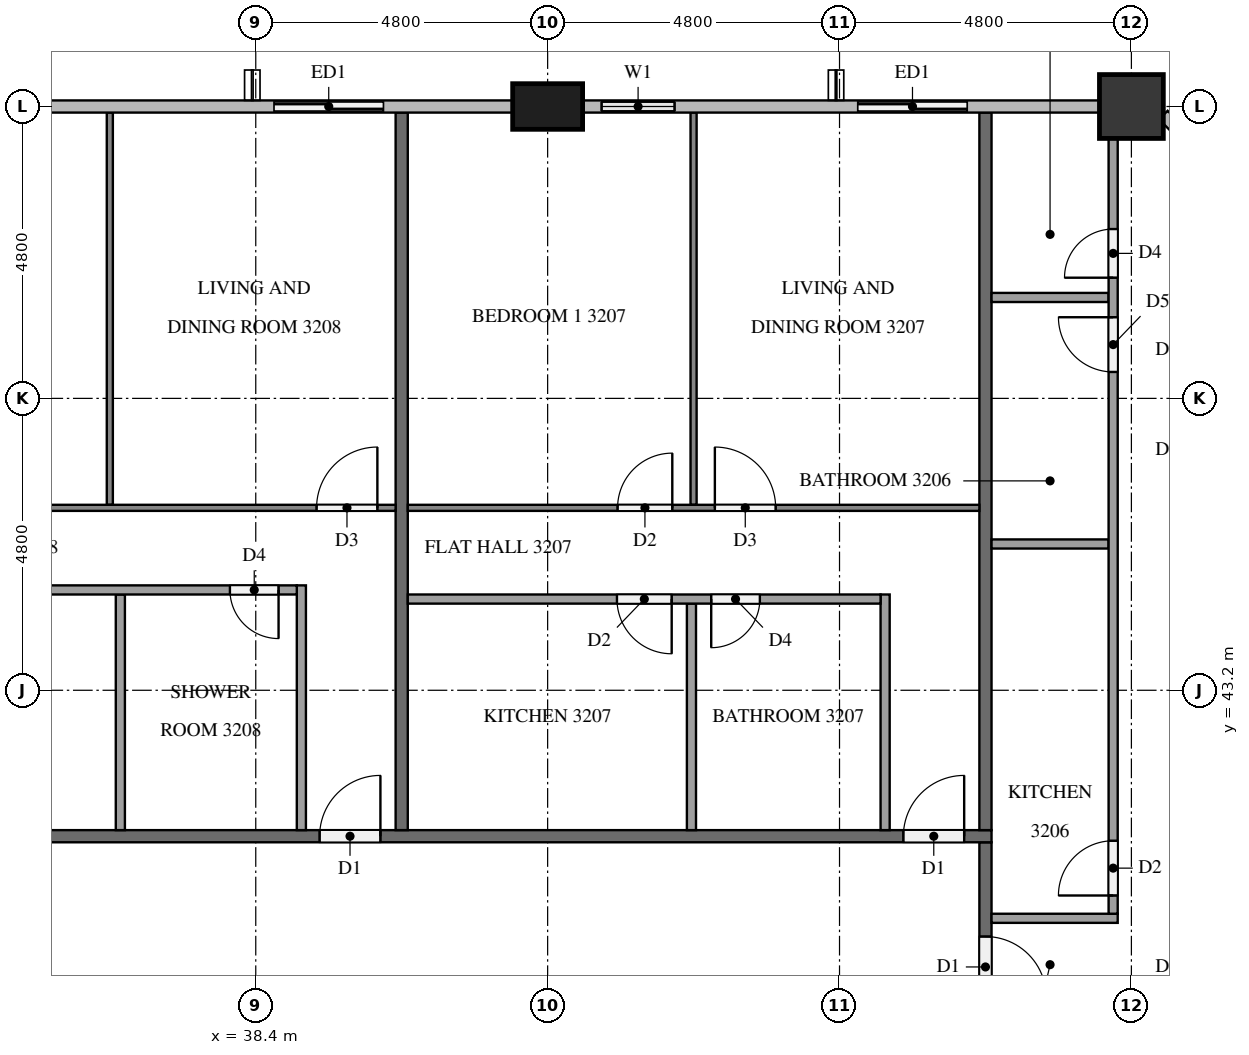
"""IFC4 building model, lengths in metres.
Left out: names, types, materials, properties, quantities, classifications, styles, units other than length and angle.
Written with IfcOpenShell. Run it as: python <this file> out.ifc"""

import sys

from ifc_helpers import new_model, si_unit, direction, frame, frame_2d, origin, origin_2d, place, context, subcontext, project, spatial, rectangle, extrude, element, fill, save


model = new_model("IFC4")
c1 = context("Model", 3, precision=1e-05, world=origin(), true_north=direction((0.0, 1.0)))
c2 = subcontext(c1, "Body", "Model", "MODEL_VIEW")
j1 = project(units=[si_unit("LENGTHUNIT", "METRE"), si_unit("PLANEANGLEUNIT", "RADIAN")], contexts=[c1])
p1 = place(None, origin())
s1 = spatial("IfcSite", under=j1, at=p1, CompositionType="ELEMENT")
p2 = place(p1, origin())
s2 = spatial("IfcBuilding", under=s1, at=p2, CompositionType="ELEMENT")
p3 = place(p2, frame((0.0, 0.0, 126.1)))
s3 = spatial("IfcBuildingStorey", under=s2, at=p3, CompositionType="ELEMENT", Elevation=126.1)
p4 = place(p3, frame((52.8, 52.8, 0.0), z_axis=(0.0, 0.0, 1.0), x_axis=(1.0, 0.0, 0.0)))
e1 = element("IfcColumn", 1, at=p4, inside=s3, PredefinedType="COLUMN", context=c2, shape_type="SweptSolid", body=[
    extrude(rectangle(XDim=1.05, YDim=1.05, at=origin_2d()), origin(), (0.0, 0.0, 1.0), 3.2),
])
p5 = place(p3, frame((43.2, 52.8, 0.0), z_axis=(0.0, 0.0, 1.0), x_axis=(1.0, 0.0, 0.0)))
e2 = element("IfcColumn", 2, at=p5, inside=s3, PredefinedType="COLUMN", context=c2, shape_type="SweptSolid", body=[
    extrude(rectangle(XDim=1.15, YDim=0.75, at=origin_2d()), origin(), (0.0, 0.0, 1.0), 3.2),
])
p6 = place(p3, frame((50.4, 52.8, 0.0), z_axis=(0.0, 0.0, 1.0), x_axis=(-1.0, 0.0, 0.0)))
e3 = element("IfcWall", 3, at=p6, inside=s3, PredefinedType="SOLIDWALL", context=c2, shape_type="SweptSolid", body=[
    extrude(rectangle(XDim=2.4, YDim=0.15, at=frame_2d((1.2, 0.0))), origin(), (0.0, 0.0, 1.0), 3.2),
])
p7 = place(p6, frame((0.3, 0.0, 0.0)))
e4 = element("IfcOpeningElement", 4, at=p7, cuts=e3, PredefinedType="OPENING", context=c2, shape_type="SweptSolid", body=[
    extrude(rectangle(XDim=1.8, YDim=2.4, at=frame_2d((0.9, 1.2))), frame((0.0, 0.085, 0.0), z_axis=(0.0, -1.0, 0.0), x_axis=(1.0, 0.0, 0.0)), (0.0, 0.0, 1.0), 0.17),
])
p8 = place(p3, frame((45.6, 52.8, 0.0), z_axis=(0.0, 0.0, 1.0), x_axis=(-1.0, 0.0, 0.0)))
e5 = element("IfcWall", 5, at=p8, inside=s3, PredefinedType="SOLIDWALL", context=c2, shape_type="SweptSolid", body=[
    extrude(rectangle(XDim=1.825, YDim=0.15, at=frame_2d((0.913, 0.0))), origin(), (0.0, 0.0, 1.0), 3.2),
])
p9 = place(p8, frame((0.312, 0.0, 0.9)))
e6 = element("IfcOpeningElement", 6, at=p9, cuts=e5, PredefinedType="OPENING", context=c2, shape_type="SweptSolid", body=[
    extrude(rectangle(XDim=1.2, YDim=1.4, at=frame_2d((0.6, 0.7))), frame((0.0, 0.085, 0.0), z_axis=(0.0, -1.0, 0.0), x_axis=(1.0, 0.0, 0.0)), (0.0, 0.0, 1.0), 0.17),
])
p10 = place(p3, frame((40.8, 52.8, 0.0), z_axis=(0.0, 0.0, 1.0), x_axis=(-1.0, 0.0, 0.0)))
e7 = element("IfcWall", 7, at=p10, inside=s3, PredefinedType="SOLIDWALL", context=c2, shape_type="SweptSolid", body=[
    extrude(rectangle(XDim=2.4, YDim=0.15, at=frame_2d((1.2, 0.0))), origin(), (0.0, 0.0, 1.0), 3.2),
])
p11 = place(p10, frame((0.3, 0.0, 0.0)))
e8 = element("IfcOpeningElement", 8, at=p11, cuts=e7, PredefinedType="OPENING", context=c2, shape_type="SweptSolid", body=[
    extrude(rectangle(XDim=1.8, YDim=2.4, at=frame_2d((0.9, 1.2))), frame((0.0, 0.085, 0.0), z_axis=(0.0, -1.0, 0.0), x_axis=(1.0, 0.0, 0.0)), (0.0, 0.0, 1.0), 0.17),
])
p12 = place(p3, frame((50.4, 40.7, 0.0), z_axis=(0.0, 0.0, 1.0), x_axis=(0.0, -1.0, 0.0)))
e9 = element("IfcWall", 9, at=p12, inside=s3, PredefinedType="PARTITIONING", context=c2, shape_type="SweptSolid", body=[
    extrude(rectangle(XDim=2.8, YDim=0.2, at=frame_2d((1.4, 0.0))), origin(), (0.0, 0.0, 1.0), 3.2),
])
p13 = place(p12, frame((1.55, 0.0, 0.0)))
e10 = element("IfcOpeningElement", 10, at=p13, cuts=e9, PredefinedType="OPENING", context=c2, shape_type="SweptSolid", body=[
    extrude(rectangle(XDim=1.0, YDim=2.1, at=frame_2d((0.5, 1.05))), frame((0.0, 0.11, 0.0), z_axis=(0.0, -1.0, 0.0), x_axis=(1.0, 0.0, 0.0)), (0.0, 0.0, 1.0), 0.22),
])
p14 = place(p3, frame((11.9, 40.8, 0.0), z_axis=(0.0, 0.0, 1.0), x_axis=(1.0, 0.0, 0.0)))
e11 = element("IfcWall", 11, at=p14, inside=s3, PredefinedType="PARTITIONING", context=c2, shape_type="SweptSolid", body=[
    extrude(rectangle(XDim=38.6, YDim=0.2, at=frame_2d((19.3, 0.0))), origin(), (0.0, 0.0, 1.0), 3.2),
])
p15 = place(p14, frame((37.15, 0.0, 0.0)))
e12 = element("IfcOpeningElement", 12, at=p15, cuts=e11, PredefinedType="OPENING", context=c2, shape_type="SweptSolid", body=[
    extrude(rectangle(XDim=1.0, YDim=2.1, at=frame_2d((0.5, 1.05))), frame((0.0, 0.11, 0.0), z_axis=(0.0, -1.0, 0.0), x_axis=(1.0, 0.0, 0.0)), (0.0, 0.0, 1.0), 0.22),
])
p16 = place(p14, frame((27.55, 0.0, 0.0)))
e13 = element("IfcOpeningElement", 13, at=p16, cuts=e11, PredefinedType="OPENING", context=c2, shape_type="SweptSolid", body=[
    extrude(rectangle(XDim=1.0, YDim=2.1, at=frame_2d((0.5, 1.05))), frame((0.0, 0.11, 0.0), z_axis=(0.0, -1.0, 0.0), x_axis=(1.0, 0.0, 0.0)), (0.0, 0.0, 1.0), 0.22),
])
p17 = place(p14, frame((13.15, 0.0, 0.0)))
e14 = element("IfcOpeningElement", 14, at=p17, cuts=e11, PredefinedType="OPENING", context=c2, shape_type="SweptSolid", body=[
    extrude(rectangle(XDim=1.0, YDim=2.1, at=frame_2d((0.5, 1.05))), frame((0.0, 0.11, 0.0), z_axis=(0.0, -1.0, 0.0), x_axis=(1.0, 0.0, 0.0)), (0.0, 0.0, 1.0), 0.22),
])
for number, where, z_axis, x_axis in (
    (15, (50.4, 40.9, 0.0), (0.0, 0.0, 1.0), (0.0, 1.0, 0.0)),
    (16, (40.8, 52.7, 0.0), (0.0, 0.0, 1.0), (0.0, -1.0, 0.0)),
):
    element("IfcWall", number, at=place(p3, frame(where, z_axis=z_axis, x_axis=x_axis)), inside=s3, PredefinedType="PARTITIONING", context=c2, shape_type="SweptSolid", body=[
        extrude(rectangle(XDim=11.8, YDim=0.2, at=frame_2d((5.9, 0.0))), origin(), (0.0, 0.0, 1.0), 3.2),
    ])
for number, where, z_axis, x_axis in (
    (17, (50.5, 45.606, 0.0), (0.0, 0.0, 1.0), (1.0, 0.0, 0.0)),
    (18, (50.5, 49.66, 0.0), (0.0, 0.0, 1.0), (1.0, 0.0, 0.0)),
):
    element("IfcWall", number, at=place(p3, frame(where, z_axis=z_axis, x_axis=x_axis)), inside=s3, PredefinedType="PARTITIONING", context=c2, shape_type="SweptSolid", body=[
        extrude(rectangle(XDim=1.925, YDim=0.15, at=frame_2d((0.962, 0.0))), origin(), (0.0, 0.0, 1.0), 3.2),
    ])
p18 = place(p3, frame((50.5, 39.45, 0.0), z_axis=(0.0, 0.0, 1.0), x_axis=(1.0, 0.0, 0.0)))
e19 = element("IfcWall", 19, at=p18, inside=s3, PredefinedType="PARTITIONING", context=c2, shape_type="SweptSolid", body=[
    extrude(rectangle(XDim=2.075, YDim=0.15, at=frame_2d((1.038, 0.0))), origin(), (0.0, 0.0, 1.0), 3.2),
])
p19 = place(p3, frame((52.5, 39.525, 0.0), z_axis=(0.0, 0.0, 1.0), x_axis=(0.0, 1.0, 0.0)))
e20 = element("IfcWall", 20, at=p19, inside=s3, PredefinedType="PARTITIONING", context=c2, shape_type="SweptSolid", body=[
    extrude(rectangle(XDim=12.75, YDim=0.15, at=frame_2d((6.375, 0.0))), origin(), (0.0, 0.0, 1.0), 3.2),
])
p20 = place(p19, frame((0.3, 0.0, 0.0)))
e21 = element("IfcOpeningElement", 21, at=p20, cuts=e20, PredefinedType="OPENING", context=c2, shape_type="SweptSolid", body=[
    extrude(rectangle(XDim=0.9, YDim=2.1, at=frame_2d((0.45, 1.05))), frame((0.0, 0.085, 0.0), z_axis=(0.0, -1.0, 0.0), x_axis=(1.0, 0.0, 0.0)), (0.0, 0.0, 1.0), 0.17),
])
p21 = place(p19, frame((8.91, 0.0, 0.0)))
e22 = element("IfcOpeningElement", 22, at=p21, cuts=e20, PredefinedType="OPENING", context=c2, shape_type="SweptSolid", body=[
    extrude(rectangle(XDim=0.9, YDim=2.1, at=frame_2d((0.45, 1.05))), frame((0.0, 0.085, 0.0), z_axis=(0.0, -1.0, 0.0), x_axis=(1.0, 0.0, 0.0)), (0.0, 0.0, 1.0), 0.17),
])
p22 = place(p19, frame((10.46, 0.0, 0.0)))
e23 = element("IfcOpeningElement", 23, at=p22, cuts=e20, PredefinedType="OPENING", context=c2, shape_type="SweptSolid", body=[
    extrude(rectangle(XDim=0.8, YDim=2.1, at=frame_2d((0.4, 1.05))), frame((0.0, 0.085, 0.0), z_axis=(0.0, -1.0, 0.0), x_axis=(1.0, 0.0, 0.0)), (0.0, 0.0, 1.0), 0.17),
])
p23 = place(p3, frame((45.6, 46.25, 0.0), z_axis=(0.0, 0.0, 1.0), x_axis=(0.0, 1.0, 0.0)))
e24 = element("IfcWall", 24, at=p23, inside=s3, PredefinedType="PARTITIONING", context=c2, shape_type="SweptSolid", body=[
    extrude(rectangle(XDim=6.45, YDim=0.1, at=frame_2d((3.225, 0.0))), origin(), (0.0, 0.0, 1.0), 3.2),
])
p24 = place(p3, frame((40.9, 46.2, 0.0), z_axis=(0.0, 0.0, 1.0), x_axis=(1.0, 0.0, 0.0)))
e25 = element("IfcWall", 25, at=p24, inside=s3, PredefinedType="PARTITIONING", context=c2, shape_type="SweptSolid", body=[
    extrude(rectangle(XDim=9.4, YDim=0.1, at=frame_2d((4.7, 0.0))), origin(), (0.0, 0.0, 1.0), 3.2),
])
p25 = place(p24, frame((5.05, 0.0, 0.0)))
e26 = element("IfcOpeningElement", 26, at=p25, cuts=e25, PredefinedType="OPENING", context=c2, shape_type="SweptSolid", body=[
    extrude(rectangle(XDim=1.0, YDim=2.1, at=frame_2d((0.5, 1.05))), frame((0.0, 0.06, 0.0), z_axis=(0.0, -1.0, 0.0), x_axis=(1.0, 0.0, 0.0)), (0.0, 0.0, 1.0), 0.12),
])
p26 = place(p24, frame((3.45, 0.0, 0.0)))
e27 = element("IfcOpeningElement", 27, at=p26, cuts=e25, PredefinedType="OPENING", context=c2, shape_type="SweptSolid", body=[
    extrude(rectangle(XDim=0.9, YDim=2.1, at=frame_2d((0.45, 1.05))), frame((0.0, 0.06, 0.0), z_axis=(0.0, -1.0, 0.0), x_axis=(1.0, 0.0, 0.0)), (0.0, 0.0, 1.0), 0.12),
])
p27 = place(p3, frame((45.565, 40.9, 0.0), z_axis=(0.0, 0.0, 1.0), x_axis=(0.0, 1.0, 0.0)))
e28 = element("IfcWall", 28, at=p27, inside=s3, PredefinedType="PARTITIONING", context=c2, shape_type="SweptSolid", body=[
    extrude(rectangle(XDim=3.725, YDim=0.15, at=frame_2d((1.863, 0.0))), origin(), (0.0, 0.0, 1.0), 3.2),
])
p28 = place(p3, frame((48.75, 40.9, 0.0), z_axis=(0.0, 0.0, 1.0), x_axis=(0.0, 1.0, 0.0)))
e29 = element("IfcWall", 29, at=p28, inside=s3, PredefinedType="PARTITIONING", context=c2, shape_type="SweptSolid", body=[
    extrude(rectangle(XDim=3.875, YDim=0.15, at=frame_2d((1.938, 0.0))), origin(), (0.0, 0.0, 1.0), 3.2),
])
p29 = place(p3, frame((48.675, 44.7, 0.0), z_axis=(0.0, 0.0, 1.0), x_axis=(-1.0, 0.0, 0.0)))
e30 = element("IfcWall", 30, at=p29, inside=s3, PredefinedType="PARTITIONING", context=c2, shape_type="SweptSolid", body=[
    extrude(rectangle(XDim=7.775, YDim=0.15, at=frame_2d((3.888, 0.0))), origin(), (0.0, 0.0, 1.0), 3.2),
])
p30 = place(p29, frame((1.985, 0.0, 0.0)))
e31 = element("IfcOpeningElement", 31, at=p30, cuts=e30, PredefinedType="OPENING", context=c2, shape_type="SweptSolid", body=[
    extrude(rectangle(XDim=0.8, YDim=2.1, at=frame_2d((0.4, 1.05))), frame((0.0, 0.085, 0.0), z_axis=(0.0, -1.0, 0.0), x_axis=(1.0, 0.0, 0.0)), (0.0, 0.0, 1.0), 0.17),
])
p31 = place(p29, frame((3.435, 0.0, 0.0)))
e32 = element("IfcOpeningElement", 32, at=p31, cuts=e30, PredefinedType="OPENING", context=c2, shape_type="SweptSolid", body=[
    extrude(rectangle(XDim=0.9, YDim=2.1, at=frame_2d((0.45, 1.05))), frame((0.0, 0.085, 0.0), z_axis=(0.0, -1.0, 0.0), x_axis=(1.0, 0.0, 0.0)), (0.0, 0.0, 1.0), 0.17),
])
p32 = place(p3, frame((36.0, 46.25, 0.0), z_axis=(0.0, 0.0, 1.0), x_axis=(0.0, 1.0, 0.0)))
e33 = element("IfcWall", 33, at=p32, inside=s3, PredefinedType="PARTITIONING", context=c2, shape_type="SweptSolid", body=[
    extrude(rectangle(XDim=6.45, YDim=0.1, at=frame_2d((3.225, 0.0))), origin(), (0.0, 0.0, 1.0), 3.2),
])
p33 = place(p3, frame((26.5, 46.2, 0.0), z_axis=(0.0, 0.0, 1.0), x_axis=(1.0, 0.0, 0.0)))
e34 = element("IfcWall", 34, at=p33, inside=s3, PredefinedType="PARTITIONING", context=c2, shape_type="SweptSolid", body=[
    extrude(rectangle(XDim=14.2, YDim=0.1, at=frame_2d((7.1, 0.0))), origin(), (0.0, 0.0, 1.0), 3.2),
])
p34 = place(p33, frame((12.9, 0.0, 0.0)))
e35 = element("IfcOpeningElement", 35, at=p34, cuts=e34, PredefinedType="OPENING", context=c2, shape_type="SweptSolid", body=[
    extrude(rectangle(XDim=1.0, YDim=2.1, at=frame_2d((0.5, 1.05))), frame((0.0, 0.06, 0.0), z_axis=(0.0, -1.0, 0.0), x_axis=(1.0, 0.0, 0.0)), (0.0, 0.0, 1.0), 0.12),
])
p35 = place(p33, frame((5.05, 0.0, 0.0)))
e36 = element("IfcOpeningElement", 36, at=p35, cuts=e34, PredefinedType="OPENING", context=c2, shape_type="SweptSolid", body=[
    extrude(rectangle(XDim=0.9, YDim=2.1, at=frame_2d((0.45, 1.05))), frame((0.0, 0.06, 0.0), z_axis=(0.0, -1.0, 0.0), x_axis=(1.0, 0.0, 0.0)), (0.0, 0.0, 1.0), 0.12),
])
p36 = place(p33, frame((3.45, 0.0, 0.0)))
e37 = element("IfcOpeningElement", 37, at=p36, cuts=e34, PredefinedType="OPENING", context=c2, shape_type="SweptSolid", body=[
    extrude(rectangle(XDim=0.9, YDim=2.1, at=frame_2d((0.45, 1.05))), frame((0.0, 0.06, 0.0), z_axis=(0.0, -1.0, 0.0), x_axis=(1.0, 0.0, 0.0)), (0.0, 0.0, 1.0), 0.12),
])
p37 = place(p3, frame((36.173, 40.9, 0.0), z_axis=(0.0, 0.0, 1.0), x_axis=(0.0, 1.0, 0.0)))
e38 = element("IfcWall", 38, at=p37, inside=s3, PredefinedType="PARTITIONING", context=c2, shape_type="SweptSolid", body=[
    extrude(rectangle(XDim=3.875, YDim=0.15, at=frame_2d((1.938, 0.0))), origin(), (0.0, 0.0, 1.0), 3.2),
])
p38 = place(p3, frame((39.15, 40.9, 0.0), z_axis=(0.0, 0.0, 1.0), x_axis=(0.0, 1.0, 0.0)))
e39 = element("IfcWall", 39, at=p38, inside=s3, PredefinedType="PARTITIONING", context=c2, shape_type="SweptSolid", body=[
    extrude(rectangle(XDim=4.025, YDim=0.15, at=frame_2d((2.013, 0.0))), origin(), (0.0, 0.0, 1.0), 3.2),
])
p39 = place(p3, frame((39.075, 44.85, 0.0), z_axis=(0.0, 0.0, 1.0), x_axis=(-1.0, 0.0, 0.0)))
e40 = element("IfcWall", 40, at=p39, inside=s3, PredefinedType="PARTITIONING", context=c2, shape_type="SweptSolid", body=[
    extrude(rectangle(XDim=12.575, YDim=0.15, at=frame_2d((6.288, 0.0))), origin(), (0.0, 0.0, 1.0), 3.2),
])
p40 = place(p39, frame((0.3, 0.0, 0.0)))
e41 = element("IfcOpeningElement", 41, at=p40, cuts=e40, PredefinedType="OPENING", context=c2, shape_type="SweptSolid", body=[
    extrude(rectangle(XDim=0.8, YDim=2.1, at=frame_2d((0.4, 1.05))), frame((0.0, 0.085, 0.0), z_axis=(0.0, -1.0, 0.0), x_axis=(1.0, 0.0, 0.0)), (0.0, 0.0, 1.0), 0.17),
])
p41 = place(p39, frame((7.481, 0.0, 0.0)))
e42 = element("IfcOpeningElement", 42, at=p41, cuts=e40, PredefinedType="OPENING", context=c2, shape_type="SweptSolid", body=[
    extrude(rectangle(XDim=0.9, YDim=2.1, at=frame_2d((0.45, 1.05))), frame((0.0, 0.085, 0.0), z_axis=(0.0, -1.0, 0.0), x_axis=(1.0, 0.0, 0.0)), (0.0, 0.0, 1.0), 0.17),
])
p42 = place(p39, frame((9.031, 0.0, 0.0)))
e43 = element("IfcOpeningElement", 43, at=p42, cuts=e40, PredefinedType="OPENING", context=c2, shape_type="SweptSolid", body=[
    extrude(rectangle(XDim=0.9, YDim=2.1, at=frame_2d((0.45, 1.05))), frame((0.0, 0.085, 0.0), z_axis=(0.0, -1.0, 0.0), x_axis=(1.0, 0.0, 0.0)), (0.0, 0.0, 1.0), 0.17),
])
p43 = place(p7, origin())
e44 = element("IfcDoor", 44, at=p43, inside=s3, OperationType="SLIDING_TO_LEFT", PredefinedType="DOOR", context=c2, shape_type="SweptSolid", body=[
    extrude(rectangle(XDim=1.8, YDim=2.4, at=frame_2d((0.9, 1.2))), frame((0.0, 0.025, 0.0), z_axis=(0.0, -1.0, 0.0), x_axis=(1.0, 0.0, 0.0)), (0.0, 0.0, 1.0), 0.05),
])
fill(e4, e44)
p44 = place(p9, origin())
e45 = element("IfcWindow", 45, at=p44, inside=s3, PartitioningType="SINGLE_PANEL", PredefinedType="WINDOW", context=c2, shape_type="SweptSolid", body=[
    extrude(rectangle(XDim=1.2, YDim=1.4, at=frame_2d((0.6, 0.7))), frame((0.0, 0.03, 0.0), z_axis=(0.0, -1.0, 0.0), x_axis=(1.0, 0.0, 0.0)), (0.0, 0.0, 1.0), 0.06),
])
fill(e6, e45)
p45 = place(p11, origin())
e46 = element("IfcDoor", 46, at=p45, inside=s3, OperationType="SLIDING_TO_RIGHT", PredefinedType="DOOR", context=c2, shape_type="SweptSolid", body=[
    extrude(rectangle(XDim=1.8, YDim=2.4, at=frame_2d((0.9, 1.2))), frame((0.0, 0.025, 0.0), z_axis=(0.0, -1.0, 0.0), x_axis=(1.0, 0.0, 0.0)), (0.0, 0.0, 1.0), 0.05),
])
fill(e8, e46)
p46 = place(p13, origin())
e47 = element("IfcDoor", 47, at=p46, inside=s3, OperationType="SINGLE_SWING_RIGHT", PredefinedType="DOOR", context=c2, shape_type="SweptSolid", body=[
    extrude(rectangle(XDim=1.0, YDim=2.1, at=frame_2d((0.5, 1.05))), frame((0.0, 0.025, 0.0), z_axis=(0.0, -1.0, 0.0), x_axis=(1.0, 0.0, 0.0)), (0.0, 0.0, 1.0), 0.05),
])
fill(e10, e47)
p47 = place(p15, origin())
e48 = element("IfcDoor", 48, at=p47, inside=s3, OperationType="SINGLE_SWING_RIGHT", PredefinedType="DOOR", context=c2, shape_type="SweptSolid", body=[
    extrude(rectangle(XDim=1.0, YDim=2.1, at=frame_2d((0.5, 1.05))), frame((0.0, 0.025, 0.0), z_axis=(0.0, -1.0, 0.0), x_axis=(1.0, 0.0, 0.0)), (0.0, 0.0, 1.0), 0.05),
])
fill(e12, e48)
p48 = place(p16, origin())
e49 = element("IfcDoor", 49, at=p48, inside=s3, OperationType="SINGLE_SWING_RIGHT", PredefinedType="DOOR", context=c2, shape_type="SweptSolid", body=[
    extrude(rectangle(XDim=1.0, YDim=2.1, at=frame_2d((0.5, 1.05))), frame((0.0, 0.025, 0.0), z_axis=(0.0, -1.0, 0.0), x_axis=(1.0, 0.0, 0.0)), (0.0, 0.0, 1.0), 0.05),
])
fill(e13, e49)
p49 = place(p20, origin())
e50 = element("IfcDoor", 50, at=p49, inside=s3, OperationType="SINGLE_SWING_LEFT", PredefinedType="DOOR", context=c2, shape_type="SweptSolid", body=[
    extrude(rectangle(XDim=0.9, YDim=2.1, at=frame_2d((0.45, 1.05))), frame((0.0, 0.025, 0.0), z_axis=(0.0, -1.0, 0.0), x_axis=(1.0, 0.0, 0.0)), (0.0, 0.0, 1.0), 0.05),
])
fill(e21, e50)
p50 = place(p21, origin())
e51 = element("IfcDoor", 51, at=p50, inside=s3, OperationType="SINGLE_SWING_RIGHT", PredefinedType="DOOR", context=c2, shape_type="SweptSolid", body=[
    extrude(rectangle(XDim=0.9, YDim=2.1, at=frame_2d((0.45, 1.05))), frame((0.0, 0.025, 0.0), z_axis=(0.0, -1.0, 0.0), x_axis=(1.0, 0.0, 0.0)), (0.0, 0.0, 1.0), 0.05),
])
fill(e22, e51)
p51 = place(p22, origin())
e52 = element("IfcDoor", 52, at=p51, inside=s3, OperationType="SINGLE_SWING_LEFT", PredefinedType="DOOR", context=c2, shape_type="SweptSolid", body=[
    extrude(rectangle(XDim=0.8, YDim=2.1, at=frame_2d((0.4, 1.05))), frame((0.0, 0.025, 0.0), z_axis=(0.0, -1.0, 0.0), x_axis=(1.0, 0.0, 0.0)), (0.0, 0.0, 1.0), 0.05),
])
fill(e23, e52)
p52 = place(p25, origin())
e53 = element("IfcDoor", 53, at=p52, inside=s3, OperationType="SINGLE_SWING_LEFT", PredefinedType="DOOR", context=c2, shape_type="SweptSolid", body=[
    extrude(rectangle(XDim=1.0, YDim=2.1, at=frame_2d((0.5, 1.05))), frame((0.0, 0.025, 0.0), z_axis=(0.0, -1.0, 0.0), x_axis=(1.0, 0.0, 0.0)), (0.0, 0.0, 1.0), 0.05),
])
fill(e26, e53)
p53 = place(p26, origin())
e54 = element("IfcDoor", 54, at=p53, inside=s3, OperationType="SINGLE_SWING_RIGHT", PredefinedType="DOOR", context=c2, shape_type="SweptSolid", body=[
    extrude(rectangle(XDim=0.9, YDim=2.1, at=frame_2d((0.45, 1.05))), frame((0.0, 0.025, 0.0), z_axis=(0.0, -1.0, 0.0), x_axis=(1.0, 0.0, 0.0)), (0.0, 0.0, 1.0), 0.05),
])
fill(e27, e54)
p54 = place(p30, origin())
e55 = element("IfcDoor", 55, at=p54, inside=s3, OperationType="SINGLE_SWING_RIGHT", PredefinedType="DOOR", context=c2, shape_type="SweptSolid", body=[
    extrude(rectangle(XDim=0.8, YDim=2.1, at=frame_2d((0.4, 1.05))), frame((0.0, 0.025, 0.0), z_axis=(0.0, -1.0, 0.0), x_axis=(1.0, 0.0, 0.0)), (0.0, 0.0, 1.0), 0.05),
])
fill(e31, e55)
p55 = place(p31, origin())
e56 = element("IfcDoor", 56, at=p55, inside=s3, OperationType="SINGLE_SWING_LEFT", PredefinedType="DOOR", context=c2, shape_type="SweptSolid", body=[
    extrude(rectangle(XDim=0.9, YDim=2.1, at=frame_2d((0.45, 1.05))), frame((0.0, 0.025, 0.0), z_axis=(0.0, -1.0, 0.0), x_axis=(1.0, 0.0, 0.0)), (0.0, 0.0, 1.0), 0.05),
])
fill(e32, e56)
p56 = place(p34, origin())
e57 = element("IfcDoor", 57, at=p56, inside=s3, OperationType="SINGLE_SWING_RIGHT", PredefinedType="DOOR", context=c2, shape_type="SweptSolid", body=[
    extrude(rectangle(XDim=1.0, YDim=2.1, at=frame_2d((0.5, 1.05))), frame((0.0, 0.025, 0.0), z_axis=(0.0, -1.0, 0.0), x_axis=(1.0, 0.0, 0.0)), (0.0, 0.0, 1.0), 0.05),
])
fill(e35, e57)
p57 = place(p40, origin())
e58 = element("IfcDoor", 58, at=p57, inside=s3, OperationType="SINGLE_SWING_LEFT", PredefinedType="DOOR", context=c2, shape_type="SweptSolid", body=[
    extrude(rectangle(XDim=0.8, YDim=2.1, at=frame_2d((0.4, 1.05))), frame((0.0, 0.025, 0.0), z_axis=(0.0, -1.0, 0.0), x_axis=(1.0, 0.0, 0.0)), (0.0, 0.0, 1.0), 0.05),
])
fill(e41, e58)
save(model, sys.argv[1])
